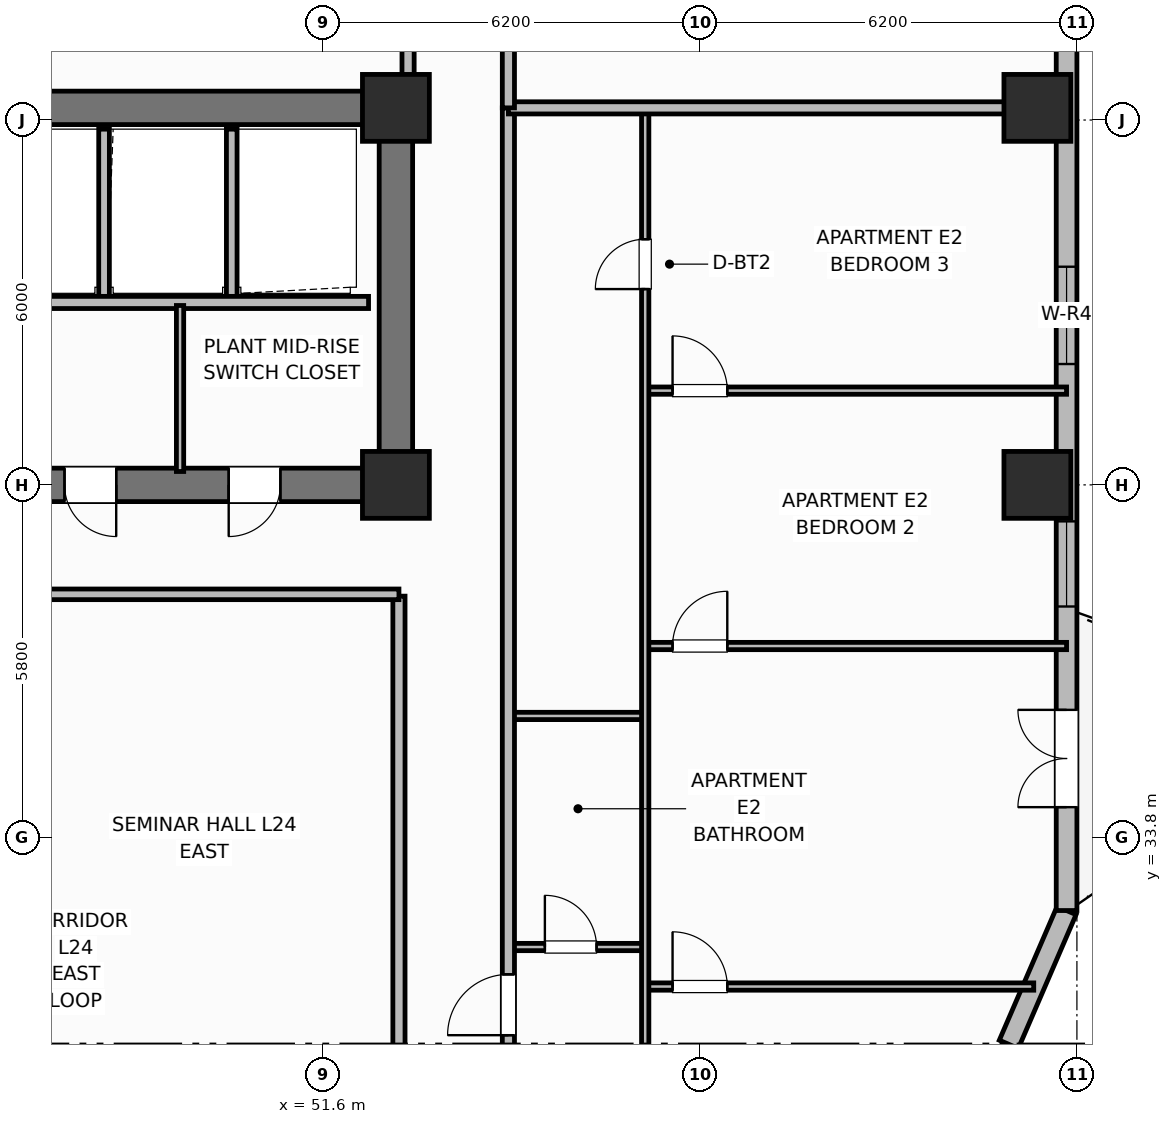
"""IFC4 building model, lengths in metres.
Left out: names, types, materials, properties, quantities, classifications, styles, units other than length and angle.
Written with IfcOpenShell. Run it as: python <this file> out.ifc"""

import sys

from ifc_helpers import new_model, si_unit, direction, frame, frame_2d, origin, origin_2d, place, context, subcontext, project, spatial, rectangle, extrude, element, fill, save


model = new_model("IFC4")
c1 = context("Model", 3, precision=1e-05, world=origin(), true_north=direction((0.0, 1.0)))
c2 = subcontext(c1, "Body", "Model", "MODEL_VIEW")
j1 = project(units=[si_unit("LENGTHUNIT", "METRE"), si_unit("PLANEANGLEUNIT", "RADIAN")], contexts=[c1])
p1 = place(None, origin())
s1 = spatial("IfcSite", under=j1, at=p1, CompositionType="ELEMENT")
p2 = place(p1, origin())
s2 = spatial("IfcBuilding", under=s1, at=p2, CompositionType="ELEMENT")
p3 = place(p2, frame((0.0, 0.0, 99.4)))
s3 = spatial("IfcBuildingStorey", under=s2, at=p3, CompositionType="ELEMENT", Elevation=99.4)
p4 = place(p3, frame((25.6, 45.8, 0.0), z_axis=(0.0, 0.0, 1.0), x_axis=(1.0, 0.0, 0.0)))
e1 = element("IfcWall", 1, at=p4, inside=s3, PredefinedType="SHEAR", context=c2, shape_type="SweptSolid", body=[
    extrude(rectangle(XDim=27.2, YDim=0.55, at=frame_2d((13.6, 0.0))), origin(), (0.0, 0.0, 1.0), 3.7),
])
p5 = place(p3, frame((52.8, 39.875, 0.0), z_axis=(0.0, 0.0, 1.0), x_axis=(0.0, 1.0, 0.0)))
e2 = element("IfcWall", 2, at=p5, inside=s3, PredefinedType="SHEAR", context=c2, shape_type="SweptSolid", body=[
    extrude(rectangle(XDim=5.65, YDim=0.55, at=frame_2d((2.825, 0.0))), origin(), (0.0, 0.0, 1.0), 3.7),
])
p6 = place(p3, frame((52.8, 39.6, 0.0), z_axis=(0.0, 0.0, 1.0), x_axis=(-1.0, 0.0, 0.0)))
e3 = element("IfcWall", 3, at=p6, inside=s3, PredefinedType="SHEAR", context=c2, shape_type="SweptSolid", body=[
    extrude(rectangle(XDim=27.2, YDim=0.55, at=frame_2d((13.6, 0.0))), origin(), (0.0, 0.0, 1.0), 3.7),
])
p7 = place(p6, frame((24.3, 0.0, 0.0)))
e4 = element("IfcOpeningElement", 4, at=p7, cuts=e3, PredefinedType="OPENING", context=c2, shape_type="SweptSolid", body=[
    extrude(rectangle(XDim=1.1, YDim=2.15, at=frame_2d((0.55, 1.075))), frame((0.0, 0.285, 0.0), z_axis=(0.0, -1.0, 0.0), x_axis=(1.0, 0.0, 0.0)), (0.0, 0.0, 1.0), 0.57),
])
p8 = place(p6, frame((21.85, 0.0, 0.0)))
e5 = element("IfcOpeningElement", 5, at=p8, cuts=e3, PredefinedType="OPENING", context=c2, shape_type="SweptSolid", body=[
    extrude(rectangle(XDim=0.85, YDim=2.1, at=frame_2d((0.425, 1.05))), frame((0.0, 0.285, 0.0), z_axis=(0.0, -1.0, 0.0), x_axis=(1.0, 0.0, 0.0)), (0.0, 0.0, 1.0), 0.57),
])
p9 = place(p6, frame((19.85, 0.0, 0.0)))
e6 = element("IfcOpeningElement", 6, at=p9, cuts=e3, PredefinedType="OPENING", context=c2, shape_type="SweptSolid", body=[
    extrude(rectangle(XDim=0.85, YDim=2.1, at=frame_2d((0.425, 1.05))), frame((0.0, 0.285, 0.0), z_axis=(0.0, -1.0, 0.0), x_axis=(1.0, 0.0, 0.0)), (0.0, 0.0, 1.0), 0.57),
])
p10 = place(p6, frame((15.1, 0.0, 0.0)))
e7 = element("IfcOpeningElement", 7, at=p10, cuts=e3, PredefinedType="OPENING", context=c2, shape_type="SweptSolid", body=[
    extrude(rectangle(XDim=1.2, YDim=2.15, at=frame_2d((0.6, 1.075))), frame((0.0, 0.285, 0.0), z_axis=(0.0, -1.0, 0.0), x_axis=(1.0, 0.0, 0.0)), (0.0, 0.0, 1.0), 0.57),
])
p11 = place(p6, frame((11.3, 0.0, 0.0)))
e8 = element("IfcOpeningElement", 8, at=p11, cuts=e3, PredefinedType="OPENING", context=c2, shape_type="SweptSolid", body=[
    extrude(rectangle(XDim=1.3, YDim=2.2, at=frame_2d((0.65, 1.1))), frame((0.0, 0.285, 0.0), z_axis=(0.0, -1.0, 0.0), x_axis=(1.0, 0.0, 0.0)), (0.0, 0.0, 1.0), 0.57),
])
p12 = place(p6, frame((7.25, 0.0, 0.0)))
e9 = element("IfcOpeningElement", 9, at=p12, cuts=e3, PredefinedType="OPENING", context=c2, shape_type="SweptSolid", body=[
    extrude(rectangle(XDim=0.85, YDim=2.1, at=frame_2d((0.425, 1.05))), frame((0.0, 0.285, 0.0), z_axis=(0.0, -1.0, 0.0), x_axis=(1.0, 0.0, 0.0)), (0.0, 0.0, 1.0), 0.57),
])
p13 = place(p6, frame((4.6, 0.0, 0.0)))
e10 = element("IfcOpeningElement", 10, at=p13, cuts=e3, PredefinedType="OPENING", context=c2, shape_type="SweptSolid", body=[
    extrude(rectangle(XDim=0.85, YDim=2.1, at=frame_2d((0.425, 1.05))), frame((0.0, 0.285, 0.0), z_axis=(0.0, -1.0, 0.0), x_axis=(1.0, 0.0, 0.0)), (0.0, 0.0, 1.0), 0.57),
])
p14 = place(p6, frame((1.9, 0.0, 0.0)))
e11 = element("IfcOpeningElement", 11, at=p14, cuts=e3, PredefinedType="OPENING", context=c2, shape_type="SweptSolid", body=[
    extrude(rectangle(XDim=0.85, YDim=2.1, at=frame_2d((0.425, 1.05))), frame((0.0, 0.285, 0.0), z_axis=(0.0, -1.0, 0.0), x_axis=(1.0, 0.0, 0.0)), (0.0, 0.0, 1.0), 0.57),
])
for number, where, z_axis, x_axis in (
    (12, (52.8, 39.6, 0.0), (0.0, 0.0, 1.0), (1.0, 0.0, 0.0)),
    (13, (52.8, 45.8, 0.0), (0.0, 0.0, 1.0), (1.0, 0.0, 0.0)),
    (14, (63.35, 39.6, 0.0), (0.0, 0.0, 1.0), (1.0, 0.0, 0.0)),
    (15, (63.35, 45.8, 0.0), (0.0, 0.0, 1.0), (1.0, 0.0, 0.0)),
):
    element("IfcColumn", number, at=place(p3, frame(where, z_axis=z_axis, x_axis=x_axis)), inside=s3, PredefinedType="COLUMN", context=c2, shape_type="SweptSolid", body=[
        extrude(rectangle(XDim=1.1, YDim=1.1, at=origin_2d()), origin(), (0.0, 0.0, 1.0), 3.7),
    ])
p15 = place(p3, frame((63.83, 29.0, 0.0), z_axis=(0.0, 0.0, 1.0), x_axis=(-0.561607274182, 0.827403933751, 0.0)))
e16 = element("IfcWall", 16, at=p15, inside=s3, PredefinedType="SOLIDWALL", context=c2, shape_type="SweptSolid", body=[
    extrude(rectangle(XDim=1.692, YDim=0.34, at=frame_2d((0.846, 0.0))), origin(), (0.0, 0.0, 1.0), 2.7),
])
p16 = place(p3, frame((62.88, 30.4, 0.0), z_axis=(0.0, 0.0, 1.0), x_axis=(0.396475042899, 0.918045500157, 0.0)))
e17 = element("IfcWall", 17, at=p16, inside=s3, PredefinedType="SOLIDWALL", context=c2, shape_type="SweptSolid", body=[
    extrude(rectangle(XDim=2.397, YDim=0.34, at=frame_2d((1.198, 0.0))), origin(), (0.0, 0.0, 1.0), 2.7),
])
p17 = place(p3, frame((63.83, 32.6, 0.0), z_axis=(0.0, 0.0, 1.0), x_axis=(0.0, 1.0, 0.0)))
e18 = element("IfcWall", 18, at=p17, inside=s3, PredefinedType="SOLIDWALL", context=c2, shape_type="SweptSolid", body=[
    extrude(rectangle(XDim=14.8, YDim=0.34, at=frame_2d((7.4, 0.0))), origin(), (0.0, 0.0, 1.0), 2.7),
])
p18 = place(p17, frame((1.7, 0.0, 0.0)))
e19 = element("IfcOpeningElement", 19, at=p18, cuts=e18, PredefinedType="OPENING", context=c2, shape_type="SweptSolid", body=[
    extrude(rectangle(XDim=1.6, YDim=2.1, at=frame_2d((0.8, 1.05))), frame((0.0, 0.18, 0.0), z_axis=(0.0, -1.0, 0.0), x_axis=(1.0, 0.0, 0.0)), (0.0, 0.0, 1.0), 0.36),
])
p19 = place(p17, frame((5.0, 0.0, 0.69)))
e20 = element("IfcOpeningElement", 20, at=p19, cuts=e18, PredefinedType="OPENING", context=c2, shape_type="SweptSolid", body=[
    extrude(rectangle(XDim=1.4, YDim=1.85, at=frame_2d((0.7, 0.925))), frame((0.0, 0.18, 0.0), z_axis=(0.0, -1.0, 0.0), x_axis=(1.0, 0.0, 0.0)), (0.0, 0.0, 1.0), 0.36),
])
p20 = place(p17, frame((8.988, 0.0, 0.68)))
e21 = element("IfcOpeningElement", 21, at=p20, cuts=e18, PredefinedType="OPENING", context=c2, shape_type="SweptSolid", body=[
    extrude(rectangle(XDim=1.6, YDim=1.9, at=frame_2d((0.8, 0.95))), frame((0.0, 0.18, 0.0), z_axis=(0.0, -1.0, 0.0), x_axis=(1.0, 0.0, 0.0)), (0.0, 0.0, 1.0), 0.36),
])
for number, where, z_axis, x_axis in (
    (22, (48.0, 42.65, 0.0), (0.0, 0.0, 1.0), (0.0, 1.0, 0.0)),
    (23, (50.1, 42.65, 0.0), (0.0, 0.0, 1.0), (0.0, 1.0, 0.0)),
):
    element("IfcWall", number, at=place(p3, frame(where, z_axis=z_axis, x_axis=x_axis)), inside=s3, PredefinedType="PARTITIONING", context=c2, shape_type="SweptSolid", body=[
        extrude(rectangle(XDim=2.8, YDim=0.175, at=frame_2d((1.4, 0.0))), origin(), (0.0, 0.0, 1.0), 2.53),
    ])
p21 = place(p3, frame((52.35, 42.6, 0.0), z_axis=(0.0, 0.0, 1.0), x_axis=(-1.0, 0.0, 0.0)))
e24 = element("IfcWall", 24, at=p21, inside=s3, PredefinedType="PARTITIONING", context=c2, shape_type="SweptSolid", body=[
    extrude(rectangle(XDim=8.8, YDim=0.2, at=frame_2d((4.4, 0.0))), origin(), (0.0, 0.0, 1.0), 2.53),
])
p22 = place(p21, frame((7.1, 0.0, 0.0)))
e25 = element("IfcOpeningElement", 25, at=p22, cuts=e24, PredefinedType="OPENING", context=c2, shape_type="SweptSolid", body=[
    extrude(rectangle(XDim=1.0, YDim=2.15, at=frame_2d((0.5, 1.075))), frame((0.0, 0.11, 0.0), z_axis=(0.0, -1.0, 0.0), x_axis=(1.0, 0.0, 0.0)), (0.0, 0.0, 1.0), 0.22),
])
p23 = place(p3, frame((49.25, 39.82, 0.0), z_axis=(0.0, 0.0, 1.0), x_axis=(0.0, 1.0, 0.0)))
e26 = element("IfcWall", 26, at=p23, inside=s3, PredefinedType="PARTITIONING", context=c2, shape_type="SweptSolid", body=[
    extrude(rectangle(XDim=2.73, YDim=0.12, at=frame_2d((1.365, 0.0))), origin(), (0.0, 0.0, 1.0), 2.53),
])
p24 = place(p3, frame((52.85, 18.63, 0.0), z_axis=(0.0, 0.0, 1.0), x_axis=(0.0, 1.0, 0.0)))
e27 = element("IfcWall", 27, at=p24, inside=s3, PredefinedType="PARTITIONING", context=c2, shape_type="SweptSolid", body=[
    extrude(rectangle(XDim=19.14, YDim=0.2, at=frame_2d((9.57, 0.0))), origin(), (0.0, 0.0, 1.0), 2.53),
])
p25 = place(p3, frame((46.35, 37.8, 0.0), z_axis=(0.0, 0.0, 1.0), x_axis=(1.0, 0.0, 0.0)))
e28 = element("IfcWall", 28, at=p25, inside=s3, PredefinedType="PARTITIONING", context=c2, shape_type="SweptSolid", body=[
    extrude(rectangle(XDim=6.5, YDim=0.175, at=frame_2d((3.25, 0.0))), origin(), (0.0, 0.0, 1.0), 2.53),
])
p26 = place(p3, frame((54.65, 32.0, 0.0), z_axis=(0.0, 0.0, 1.0), x_axis=(1.0, 0.0, 0.0)))
e29 = element("IfcWall", 29, at=p26, inside=s3, PredefinedType="PARTITIONING", context=c2, shape_type="SweptSolid", body=[
    extrude(rectangle(XDim=2.25, YDim=0.12, at=frame_2d((1.125, 0.0))), origin(), (0.0, 0.0, 1.0), 2.53),
])
p27 = place(p26, frame((0.6, 0.0, 0.0)))
e30 = element("IfcOpeningElement", 30, at=p27, cuts=e29, PredefinedType="OPENING", context=c2, shape_type="SweptSolid", body=[
    extrude(rectangle(XDim=0.85, YDim=2.1, at=frame_2d((0.425, 1.05))), frame((0.0, 0.07, 0.0), z_axis=(0.0, -1.0, 0.0), x_axis=(1.0, 0.0, 0.0)), (0.0, 0.0, 1.0), 0.14),
])
p28 = place(p3, frame((54.65, 35.8, 0.0), z_axis=(0.0, 0.0, 1.0), x_axis=(1.0, 0.0, 0.0)))
e31 = element("IfcWall", 31, at=p28, inside=s3, PredefinedType="PARTITIONING", context=c2, shape_type="SweptSolid", body=[
    extrude(rectangle(XDim=2.25, YDim=0.12, at=frame_2d((1.125, 0.0))), origin(), (0.0, 0.0, 1.0), 2.53),
])
p29 = place(p3, frame((56.9, 31.35, 0.0), z_axis=(0.0, 0.0, 1.0), x_axis=(1.0, 0.0, 0.0)))
e32 = element("IfcWall", 32, at=p29, inside=s3, PredefinedType="PARTITIONING", context=c2, shape_type="SweptSolid", body=[
    extrude(rectangle(XDim=6.39, YDim=0.12, at=frame_2d((3.195, 0.0))), origin(), (0.0, 0.0, 1.0), 2.53),
])
p30 = place(p29, frame((0.45, 0.0, 0.0)))
e33 = element("IfcOpeningElement", 33, at=p30, cuts=e32, PredefinedType="OPENING", context=c2, shape_type="SweptSolid", body=[
    extrude(rectangle(XDim=0.9, YDim=2.1, at=frame_2d((0.45, 1.05))), frame((0.0, 0.07, 0.0), z_axis=(0.0, -1.0, 0.0), x_axis=(1.0, 0.0, 0.0)), (0.0, 0.0, 1.0), 0.14),
])
p31 = place(p3, frame((56.9, 36.95, 0.0), z_axis=(0.0, 0.0, 1.0), x_axis=(1.0, 0.0, 0.0)))
e34 = element("IfcWall", 34, at=p31, inside=s3, PredefinedType="PARTITIONING", context=c2, shape_type="SweptSolid", body=[
    extrude(rectangle(XDim=6.93, YDim=0.12, at=frame_2d((3.465, 0.0))), origin(), (0.0, 0.0, 1.0), 2.53),
])
p32 = place(p31, frame((0.45, 0.0, 0.0)))
e35 = element("IfcOpeningElement", 35, at=p32, cuts=e34, PredefinedType="OPENING", context=c2, shape_type="SweptSolid", body=[
    extrude(rectangle(XDim=0.9, YDim=2.1, at=frame_2d((0.45, 1.05))), frame((0.0, 0.07, 0.0), z_axis=(0.0, -1.0, 0.0), x_axis=(1.0, 0.0, 0.0)), (0.0, 0.0, 1.0), 0.14),
])
p33 = place(p3, frame((56.9, 41.15, 0.0), z_axis=(0.0, 0.0, 1.0), x_axis=(1.0, 0.0, 0.0)))
e36 = element("IfcWall", 36, at=p33, inside=s3, PredefinedType="PARTITIONING", context=c2, shape_type="SweptSolid", body=[
    extrude(rectangle(XDim=6.93, YDim=0.12, at=frame_2d((3.465, 0.0))), origin(), (0.0, 0.0, 1.0), 2.53),
])
p34 = place(p33, frame((0.45, 0.0, 0.0)))
e37 = element("IfcOpeningElement", 37, at=p34, cuts=e36, PredefinedType="OPENING", context=c2, shape_type="SweptSolid", body=[
    extrude(rectangle(XDim=0.9, YDim=2.1, at=frame_2d((0.45, 1.05))), frame((0.0, 0.07, 0.0), z_axis=(0.0, -1.0, 0.0), x_axis=(1.0, 0.0, 0.0)), (0.0, 0.0, 1.0), 0.14),
])
p35 = place(p3, frame((56.9, 26.64, 0.0), z_axis=(0.0, 0.0, 1.0), x_axis=(0.0, 1.0, 0.0)))
e38 = element("IfcWall", 38, at=p35, inside=s3, PredefinedType="PARTITIONING", context=c2, shape_type="SweptSolid", body=[
    extrude(rectangle(XDim=19.12, YDim=0.12, at=frame_2d((9.56, 0.0))), origin(), (0.0, 0.0, 1.0), 2.53),
])
p36 = place(p35, frame((2.81, 0.0, 0.0)))
e39 = element("IfcOpeningElement", 39, at=p36, cuts=e38, PredefinedType="OPENING", context=c2, shape_type="SweptSolid", body=[
    extrude(rectangle(XDim=0.9, YDim=2.1, at=frame_2d((0.45, 1.05))), frame((0.0, 0.07, 0.0), z_axis=(0.0, -1.0, 0.0), x_axis=(1.0, 0.0, 0.0)), (0.0, 0.0, 1.0), 0.14),
])
p37 = place(p35, frame((16.18, 0.0, 0.0)))
e40 = element("IfcOpeningElement", 40, at=p37, cuts=e38, PredefinedType="OPENING", context=c2, shape_type="SweptSolid", body=[
    extrude(rectangle(XDim=0.82, YDim=2.08, at=frame_2d((0.41, 1.04))), frame((0.0, 0.07, 0.0), z_axis=(0.0, -1.0, 0.0), x_axis=(1.0, 0.0, 0.0)), (0.0, 0.0, 1.0), 0.14),
])
p38 = place(p3, frame((54.65, 10.6, 0.0), z_axis=(0.0, 0.0, 1.0), x_axis=(0.0, 1.0, 0.0)))
e41 = element("IfcWall", 41, at=p38, inside=s3, PredefinedType="PARTITIONING", context=c2, shape_type="SweptSolid", body=[
    extrude(rectangle(XDim=35.2, YDim=0.2, at=frame_2d((17.6, 0.0))), origin(), (0.0, 0.0, 1.0), 2.53),
])
p39 = place(p38, frame((2.65, 0.0, 0.0)))
e42 = element("IfcOpeningElement", 42, at=p39, cuts=e41, PredefinedType="OPENING", context=c2, shape_type="SweptSolid", body=[
    extrude(rectangle(XDim=1.0, YDim=2.15, at=frame_2d((0.5, 1.075))), frame((0.0, 0.11, 0.0), z_axis=(0.0, -1.0, 0.0), x_axis=(1.0, 0.0, 0.0)), (0.0, 0.0, 1.0), 0.22),
])
p40 = place(p38, frame((19.95, 0.0, 0.0)))
e43 = element("IfcOpeningElement", 43, at=p40, cuts=e41, PredefinedType="OPENING", context=c2, shape_type="SweptSolid", body=[
    extrude(rectangle(XDim=1.0, YDim=2.15, at=frame_2d((0.5, 1.075))), frame((0.0, 0.11, 0.0), z_axis=(0.0, -1.0, 0.0), x_axis=(1.0, 0.0, 0.0)), (0.0, 0.0, 1.0), 0.22),
])
p41 = place(p3, frame((54.65, 45.8, 0.0), z_axis=(0.0, 0.0, 1.0), x_axis=(1.0, 0.0, 0.0)))
e44 = element("IfcWall", 44, at=p41, inside=s3, PredefinedType="PARTITIONING", context=c2, shape_type="SweptSolid", body=[
    extrude(rectangle(XDim=8.76, YDim=0.2, at=frame_2d((4.38, 0.0))), origin(), (0.0, 0.0, 1.0), 2.53),
])
p42 = place(p3, frame((54.65, 45.8, 0.0), z_axis=(0.0, 0.0, 1.0), x_axis=(0.0, 1.0, 0.0)))
e45 = element("IfcWall", 45, at=p42, inside=s3, PredefinedType="PARTITIONING", context=c2, shape_type="SweptSolid", body=[
    extrude(rectangle(XDim=5.63, YDim=0.2, at=frame_2d((2.815, 0.0))), origin(), (0.0, 0.0, 1.0), 2.53),
])
p43 = place(p3, frame((53.0, 46.1, 0.0), z_axis=(0.0, 0.0, 1.0), x_axis=(0.0, 1.0, 0.0)))
e46 = element("IfcWall", 46, at=p43, inside=s3, PredefinedType="PARTITIONING", context=c2, shape_type="SweptSolid", body=[
    extrude(rectangle(XDim=4.33, YDim=0.2, at=frame_2d((2.165, 0.0))), origin(), (0.0, 0.0, 1.0), 2.53),
])
p44 = place(p43, frame((1.05, 0.0, 0.0)))
e47 = element("IfcOpeningElement", 47, at=p44, cuts=e46, PredefinedType="OPENING", context=c2, shape_type="SweptSolid", body=[
    extrude(rectangle(XDim=0.9, YDim=2.1, at=frame_2d((0.45, 1.05))), frame((0.0, 0.11, 0.0), z_axis=(0.0, -1.0, 0.0), x_axis=(1.0, 0.0, 0.0)), (0.0, 0.0, 1.0), 0.22),
])
p45 = place(p18, origin())
e48 = element("IfcDoor", 48, at=p45, inside=s3, OperationType="DOUBLE_DOOR_SINGLE_SWING", PredefinedType="DOOR", context=c2, shape_type="SweptSolid", body=[
    extrude(rectangle(XDim=1.6, YDim=2.1, at=frame_2d((0.8, 1.05))), frame((0.0, 0.025, 0.0), z_axis=(0.0, -1.0, 0.0), x_axis=(1.0, 0.0, 0.0)), (0.0, 0.0, 1.0), 0.05),
])
fill(e19, e48)
p46 = place(p19, origin())
e49 = element("IfcWindow", 49, at=p46, inside=s3, PartitioningType="SINGLE_PANEL", PredefinedType="WINDOW", context=c2, shape_type="SweptSolid", body=[
    extrude(rectangle(XDim=1.4, YDim=1.85, at=frame_2d((0.7, 0.925))), frame((0.0, 0.03, 0.0), z_axis=(0.0, -1.0, 0.0), x_axis=(1.0, 0.0, 0.0)), (0.0, 0.0, 1.0), 0.06),
])
fill(e20, e49)
p47 = place(p20, origin())
e50 = element("IfcWindow", 50, at=p47, inside=s3, PartitioningType="SINGLE_PANEL", PredefinedType="WINDOW", context=c2, shape_type="SweptSolid", body=[
    extrude(rectangle(XDim=1.6, YDim=1.9, at=frame_2d((0.8, 0.95))), frame((0.0, 0.03, 0.0), z_axis=(0.0, -1.0, 0.0), x_axis=(1.0, 0.0, 0.0)), (0.0, 0.0, 1.0), 0.06),
])
fill(e21, e50)
p48 = place(p27, origin())
e51 = element("IfcDoor", 51, at=p48, inside=s3, OperationType="SINGLE_SWING_LEFT", PredefinedType="DOOR", context=c2, shape_type="SweptSolid", body=[
    extrude(rectangle(XDim=0.85, YDim=2.1, at=frame_2d((0.425, 1.05))), frame((0.0, 0.025, 0.0), z_axis=(0.0, -1.0, 0.0), x_axis=(1.0, 0.0, 0.0)), (0.0, 0.0, 1.0), 0.05),
])
fill(e30, e51)
p49 = place(p30, origin())
e52 = element("IfcDoor", 52, at=p49, inside=s3, OperationType="SINGLE_SWING_LEFT", PredefinedType="DOOR", context=c2, shape_type="SweptSolid", body=[
    extrude(rectangle(XDim=0.9, YDim=2.1, at=frame_2d((0.45, 1.05))), frame((0.0, 0.025, 0.0), z_axis=(0.0, -1.0, 0.0), x_axis=(1.0, 0.0, 0.0)), (0.0, 0.0, 1.0), 0.05),
])
fill(e33, e52)
p50 = place(p32, origin())
e53 = element("IfcDoor", 53, at=p50, inside=s3, OperationType="SINGLE_SWING_RIGHT", PredefinedType="DOOR", context=c2, shape_type="SweptSolid", body=[
    extrude(rectangle(XDim=0.9, YDim=2.1, at=frame_2d((0.45, 1.05))), frame((0.0, 0.025, 0.0), z_axis=(0.0, -1.0, 0.0), x_axis=(1.0, 0.0, 0.0)), (0.0, 0.0, 1.0), 0.05),
])
fill(e35, e53)
p51 = place(p34, origin())
e54 = element("IfcDoor", 54, at=p51, inside=s3, OperationType="SINGLE_SWING_LEFT", PredefinedType="DOOR", context=c2, shape_type="SweptSolid", body=[
    extrude(rectangle(XDim=0.9, YDim=2.1, at=frame_2d((0.45, 1.05))), frame((0.0, 0.025, 0.0), z_axis=(0.0, -1.0, 0.0), x_axis=(1.0, 0.0, 0.0)), (0.0, 0.0, 1.0), 0.05),
])
fill(e37, e54)
p52 = place(p37, origin())
e55 = element("IfcDoor", 55, at=p52, inside=s3, OperationType="SINGLE_SWING_LEFT", PredefinedType="DOOR", context=c2, shape_type="SweptSolid", body=[
    extrude(rectangle(XDim=0.82, YDim=2.08, at=frame_2d((0.41, 1.04))), frame((0.0, 0.025, 0.0), z_axis=(0.0, -1.0, 0.0), x_axis=(1.0, 0.0, 0.0)), (0.0, 0.0, 1.0), 0.05),
])
fill(e40, e55)
p53 = place(p40, origin())
e56 = element("IfcDoor", 56, at=p53, inside=s3, OperationType="SINGLE_SWING_LEFT", PredefinedType="DOOR", context=c2, shape_type="SweptSolid", body=[
    extrude(rectangle(XDim=1.0, YDim=2.15, at=frame_2d((0.5, 1.075))), frame((0.0, 0.025, 0.0), z_axis=(0.0, -1.0, 0.0), x_axis=(1.0, 0.0, 0.0)), (0.0, 0.0, 1.0), 0.05),
])
fill(e43, e56)
p54 = place(p13, origin())
e57 = element("IfcDoor", 57, at=p54, inside=s3, OperationType="SINGLE_SWING_LEFT", PredefinedType="DOOR", context=c2, shape_type="SweptSolid", body=[
    extrude(rectangle(XDim=0.85, YDim=2.1, at=frame_2d((0.425, 1.05))), frame((0.0, 0.025, 0.0), z_axis=(0.0, -1.0, 0.0), x_axis=(1.0, 0.0, 0.0)), (0.0, 0.0, 1.0), 0.05),
])
fill(e10, e57)
p55 = place(p14, origin())
e58 = element("IfcDoor", 58, at=p55, inside=s3, OperationType="SINGLE_SWING_RIGHT", PredefinedType="DOOR", context=c2, shape_type="SweptSolid", body=[
    extrude(rectangle(XDim=0.85, YDim=2.1, at=frame_2d((0.425, 1.05))), frame((0.0, 0.025, 0.0), z_axis=(0.0, -1.0, 0.0), x_axis=(1.0, 0.0, 0.0)), (0.0, 0.0, 1.0), 0.05),
])
fill(e11, e58)
save(model, sys.argv[1])
